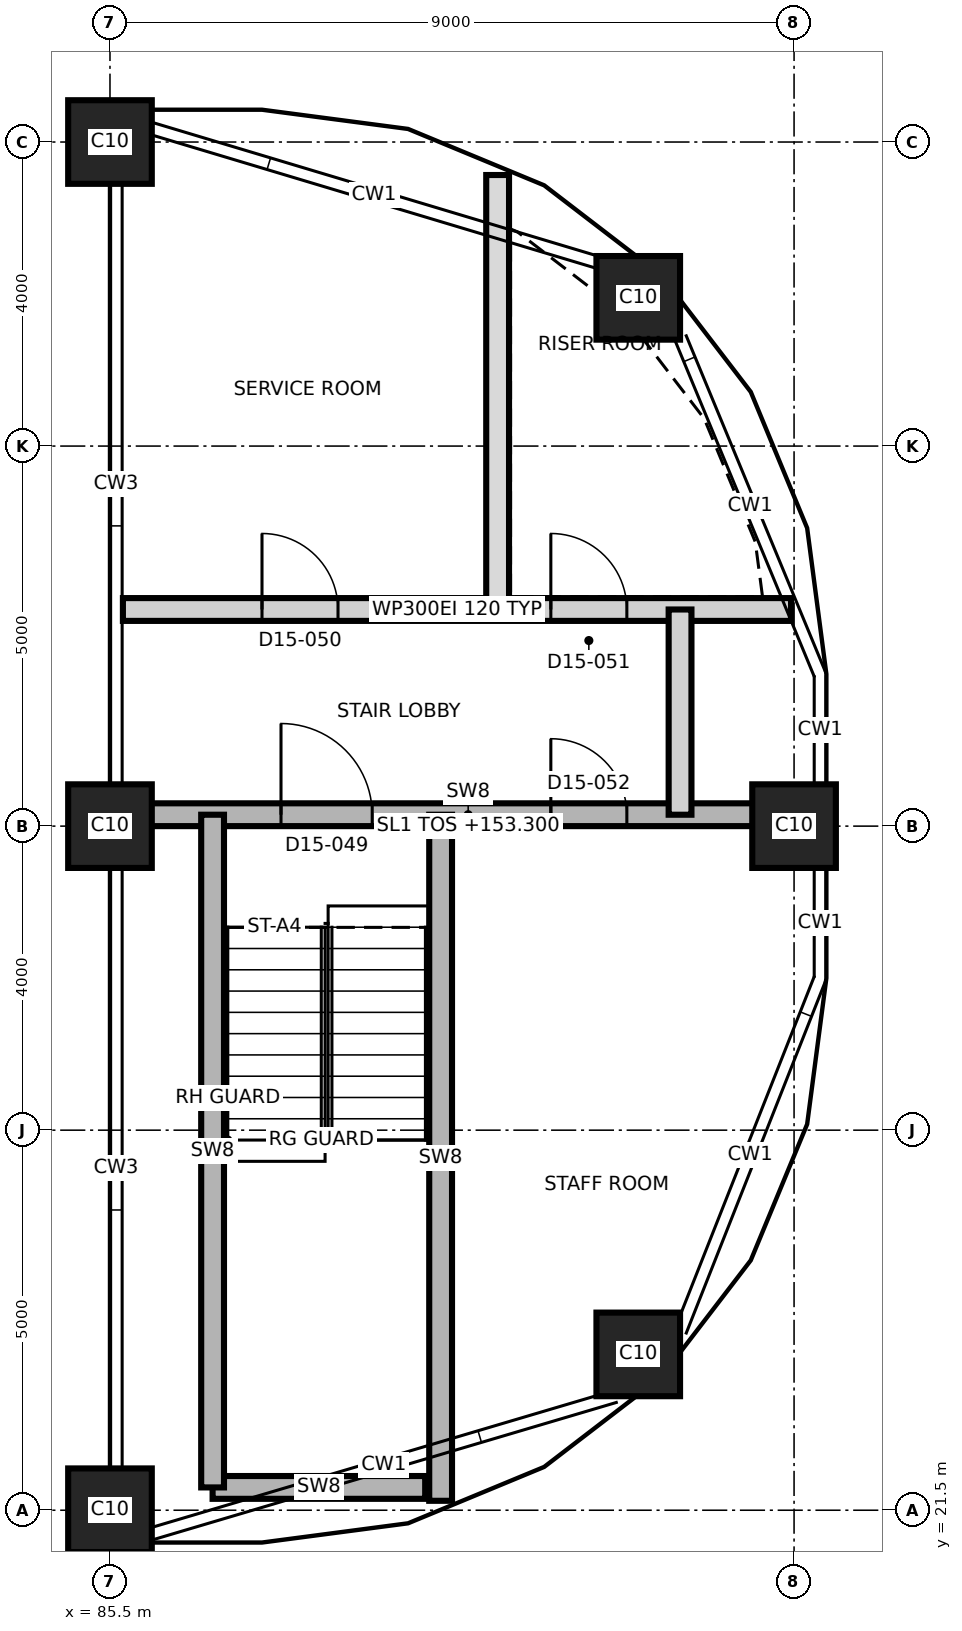
"""IFC4 building model, lengths in metres.
Left out: names, types, materials, properties, quantities, classifications, styles, units other than length and angle.
Written with IfcOpenShell. Run it as: python <this file> out.ifc"""

import sys

from ifc_helpers import new_model, si_unit, direction, frame, frame_2d, origin, origin_2d, place, context, subcontext, project, spatial, rectangle, extrude, element, fill, save


model = new_model("IFC4")
c1 = context("Model", 3, precision=1e-05, world=origin(), true_north=direction((0.0, 1.0)))
c2 = subcontext(c1, "Body", "Model", "MODEL_VIEW")
j1 = project(units=[si_unit("LENGTHUNIT", "METRE"), si_unit("PLANEANGLEUNIT", "RADIAN")], contexts=[c1])
p1 = place(None, origin())
s1 = spatial("IfcSite", under=j1, at=p1, CompositionType="ELEMENT")
p2 = place(p1, origin())
s2 = spatial("IfcBuilding", under=s1, at=p2, CompositionType="ELEMENT")
p3 = place(p2, frame((0.0, 0.0, 153.3)))
s3 = spatial("IfcBuildingStorey", under=s2, at=p3, CompositionType="ELEMENT", Elevation=153.3)
for number, where, z_axis, x_axis in (
    (1, (85.5, 21.5, 0.0), (0.0, 0.0, 1.0), (1.0, 0.0, 0.0)),
    (2, (92.45, 23.55, 0.0), (0.0, 0.0, 1.0), (1.0, 0.0, 0.0)),
    (3, (85.5, 30.5, 0.0), (0.0, 0.0, 1.0), (1.0, 0.0, 0.0)),
    (4, (94.5, 30.5, 0.0), (0.0, 0.0, 1.0), (1.0, 0.0, 0.0)),
    (5, (92.45, 37.45, 0.0), (0.0, 0.0, 1.0), (1.0, 0.0, 0.0)),
    (6, (85.5, 39.5, 0.0), (0.0, 0.0, 1.0), (1.0, 0.0, 0.0)),
):
    element("IfcColumn", number, at=place(p3, frame(where, z_axis=z_axis, x_axis=x_axis)), inside=s3, PredefinedType="COLUMN", context=c2, shape_type="SweptSolid", body=[
        extrude(rectangle(XDim=1.1, YDim=1.1, at=origin_2d()), origin(), (0.0, 0.0, 1.0), 3.7),
    ])
p4 = place(p3, frame((86.85, 21.8, 0.0), z_axis=(0.0, 0.0, 1.0), x_axis=(1.0, 0.0, 0.0)))
e7 = element("IfcWall", 7, at=p4, inside=s3, PredefinedType="SHEAR", context=c2, shape_type="SweptSolid", body=[
    extrude(rectangle(XDim=2.797, YDim=0.3, at=frame_2d((1.398, 0.0))), origin(), (0.0, 0.0, 1.0), 3.4),
])
p5 = place(p3, frame((85.85, 30.65, 0.0), z_axis=(0.0, 0.0, 1.0), x_axis=(1.0, 0.0, 0.0)))
e8 = element("IfcWall", 8, at=p5, inside=s3, PredefinedType="SHEAR", context=c2, shape_type="SweptSolid", body=[
    extrude(rectangle(XDim=8.725, YDim=0.3, at=frame_2d((4.362, 0.0))), origin(), (0.0, 0.0, 1.0), 3.4),
])
p6 = place(p5, frame((1.9, 0.0, 0.0)))
e9 = element("IfcOpeningElement", 9, at=p6, cuts=e8, PredefinedType="OPENING", context=c2, shape_type="SweptSolid", body=[
    extrude(rectangle(XDim=1.2, YDim=2.1, at=frame_2d((0.6, 1.05))), frame((0.0, 0.16, 0.0), z_axis=(0.0, -1.0, 0.0), x_axis=(1.0, 0.0, 0.0)), (0.0, 0.0, 1.0), 0.32),
])
p7 = place(p5, frame((5.45, 0.0, 0.0)))
e10 = element("IfcOpeningElement", 10, at=p7, cuts=e8, PredefinedType="OPENING", context=c2, shape_type="SweptSolid", body=[
    extrude(rectangle(XDim=1.0, YDim=2.1, at=frame_2d((0.5, 1.05))), frame((0.0, 0.16, 0.0), z_axis=(0.0, -1.0, 0.0), x_axis=(1.0, 0.0, 0.0)), (0.0, 0.0, 1.0), 0.32),
])
p8 = place(p3, frame((85.67, 33.35, 0.0), z_axis=(0.0, 0.0, 1.0), x_axis=(1.0, 0.0, 0.0)))
e11 = element("IfcWall", 11, at=p8, inside=s3, PredefinedType="PARTITIONING", context=c2, shape_type="SweptSolid", body=[
    extrude(rectangle(XDim=8.79, YDim=0.3, at=frame_2d((4.395, 0.0))), origin(), (0.0, 0.0, 1.0), 3.4),
])
p9 = place(p8, frame((1.83, 0.0, 0.0)))
e12 = element("IfcOpeningElement", 12, at=p9, cuts=e11, PredefinedType="OPENING", context=c2, shape_type="SweptSolid", body=[
    extrude(rectangle(XDim=1.0, YDim=2.1, at=frame_2d((0.5, 1.05))), frame((0.0, 0.16, 0.0), z_axis=(0.0, -1.0, 0.0), x_axis=(1.0, 0.0, 0.0)), (0.0, 0.0, 1.0), 0.32),
])
p10 = place(p8, frame((5.63, 0.0, 0.0)))
e13 = element("IfcOpeningElement", 13, at=p10, cuts=e11, PredefinedType="OPENING", context=c2, shape_type="SweptSolid", body=[
    extrude(rectangle(XDim=1.0, YDim=2.1, at=frame_2d((0.5, 1.05))), frame((0.0, 0.16, 0.0), z_axis=(0.0, -1.0, 0.0), x_axis=(1.0, 0.0, 0.0)), (0.0, 0.0, 1.0), 0.32),
])
p11 = place(p3, frame((86.85, 21.8, 0.0), z_axis=(0.0, 0.0, 1.0), x_axis=(0.0, 1.0, 0.0)))
e14 = element("IfcWall", 14, at=p11, inside=s3, PredefinedType="SHEAR", context=c2, shape_type="SweptSolid", body=[
    extrude(rectangle(XDim=8.85, YDim=0.3, at=frame_2d((4.425, 0.0))), origin(), (0.0, 0.0, 1.0), 3.4),
])
p12 = place(p3, frame((89.85, 21.624, 0.0), z_axis=(0.0, 0.0, 1.0), x_axis=(0.0, 1.0, 0.0)))
e15 = element("IfcWall", 15, at=p12, inside=s3, PredefinedType="SHEAR", context=c2, shape_type="SweptSolid", body=[
    extrude(rectangle(XDim=9.026, YDim=0.3, at=frame_2d((4.513, 0.0))), origin(), (0.0, 0.0, 1.0), 3.4),
])
p13 = place(p3, frame((90.6, 33.35, 0.0), z_axis=(0.0, 0.0, 1.0), x_axis=(0.0, 1.0, 0.0)))
e16 = element("IfcWall", 16, at=p13, inside=s3, PredefinedType="PARTITIONING", context=c2, shape_type="SweptSolid", body=[
    extrude(rectangle(XDim=5.716, YDim=0.3, at=frame_2d((2.858, 0.0))), origin(), (0.0, 0.0, 1.0), 3.4),
])
p14 = place(p3, frame((93.0, 30.65, 0.0), z_axis=(0.0, 0.0, 1.0), x_axis=(0.0, 1.0, 0.0)))
e17 = element("IfcWall", 17, at=p14, inside=s3, PredefinedType="PARTITIONING", context=c2, shape_type="SweptSolid", body=[
    extrude(rectangle(XDim=2.7, YDim=0.3, at=frame_2d((1.35, 0.0))), origin(), (0.0, 0.0, 1.0), 3.4),
])
p15 = place(p6, origin())
e18 = element("IfcDoor", 18, at=p15, inside=s3, OperationType="SINGLE_SWING_LEFT", PredefinedType="DOOR", context=c2, shape_type="SweptSolid", body=[
    extrude(rectangle(XDim=1.2, YDim=2.1, at=frame_2d((0.6, 1.05))), frame((0.0, 0.025, 0.0), z_axis=(0.0, -1.0, 0.0), x_axis=(1.0, 0.0, 0.0)), (0.0, 0.0, 1.0), 0.05),
])
fill(e9, e18)
p16 = place(p9, origin())
e19 = element("IfcDoor", 19, at=p16, inside=s3, OperationType="SINGLE_SWING_LEFT", PredefinedType="DOOR", context=c2, shape_type="SweptSolid", body=[
    extrude(rectangle(XDim=1.0, YDim=2.1, at=frame_2d((0.5, 1.05))), frame((0.0, 0.025, 0.0), z_axis=(0.0, -1.0, 0.0), x_axis=(1.0, 0.0, 0.0)), (0.0, 0.0, 1.0), 0.05),
])
fill(e12, e19)
p17 = place(p10, origin())
e20 = element("IfcDoor", 20, at=p17, inside=s3, OperationType="SINGLE_SWING_RIGHT", PredefinedType="DOOR", context=c2, shape_type="SweptSolid", body=[
    extrude(rectangle(XDim=1.0, YDim=2.1, at=frame_2d((0.5, 1.05))), frame((0.0, 0.025, 0.0), z_axis=(0.0, -1.0, 0.0), x_axis=(1.0, 0.0, 0.0)), (0.0, 0.0, 1.0), 0.05),
])
fill(e13, e20)
p18 = place(p7, origin())
e21 = element("IfcDoor", 21, at=p18, inside=s3, OperationType="SINGLE_SWING_LEFT", PredefinedType="DOOR", context=c2, shape_type="SweptSolid", body=[
    extrude(rectangle(XDim=1.0, YDim=2.1, at=frame_2d((0.5, 1.05))), frame((0.0, 0.025, 0.0), z_axis=(0.0, -1.0, 0.0), x_axis=(1.0, 0.0, 0.0)), (0.0, 0.0, 1.0), 0.05),
])
fill(e10, e21)
save(model, sys.argv[1])
